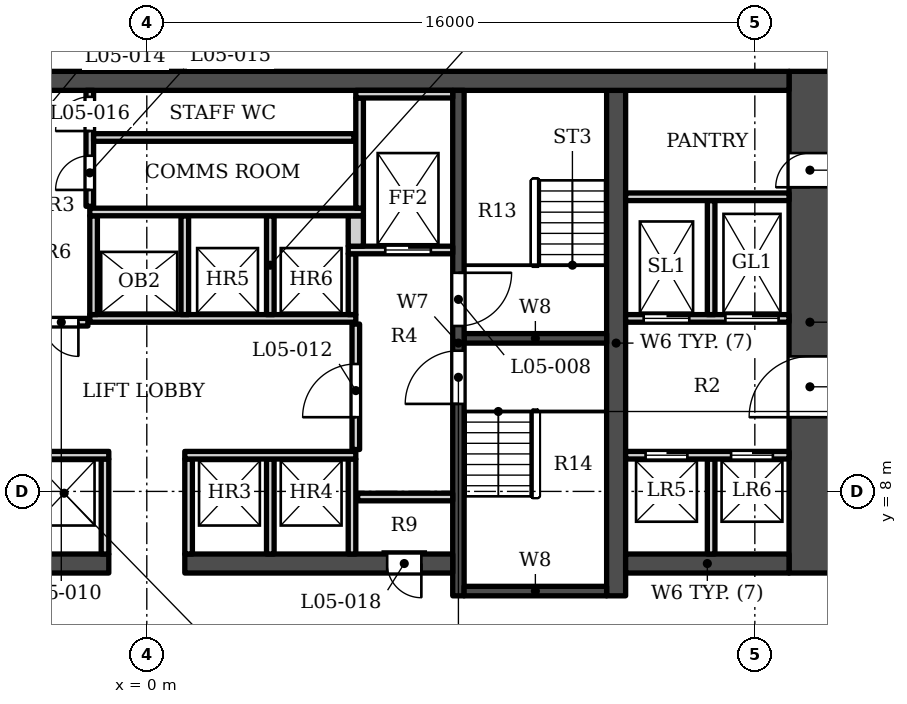
"""IFC4 building model, lengths in metres.
Left out: names, types, materials, properties, quantities, classifications, styles, units other than length and angle.
Written with IfcOpenShell. Run it as: python <this file> out.ifc"""

import sys

from ifc_helpers import new_model, si_unit, direction, frame, frame_2d, origin, place, context, subcontext, project, spatial, rectangle, extrude, element, fill, save


model = new_model("IFC4")
c1 = context("Model", 3, precision=1e-05, world=origin(), true_north=direction((0.0, 1.0)))
c2 = subcontext(c1, "Body", "Model", "MODEL_VIEW")
j1 = project(units=[si_unit("LENGTHUNIT", "METRE"), si_unit("PLANEANGLEUNIT", "RADIAN")], contexts=[c1])
p1 = place(None, origin())
s1 = spatial("IfcSite", under=j1, at=p1, CompositionType="ELEMENT")
p2 = place(p1, origin())
s2 = spatial("IfcBuilding", under=s1, at=p2, CompositionType="ELEMENT")
p3 = place(p2, frame((0.0, 0.0, 40.0)))
s3 = spatial("IfcBuildingStorey", under=s2, at=p3, CompositionType="ELEMENT", Elevation=40.0)
p4 = place(p3, frame((-16.9, 18.802, 0.0), z_axis=(0.0, 0.0, 1.0), x_axis=(1.0, 0.0, 0.0)))
e1 = element("IfcWall", 1, at=p4, inside=s3, PredefinedType="SHEAR", context=c2, shape_type="SweptSolid", body=[
    extrude(rectangle(XDim=33.8, YDim=0.5, at=frame_2d((16.9, 0.0))), origin(), (0.0, 0.0, 1.0), 6.0),
])
p5 = place(p3, frame((12.35, 5.253, 0.0), z_axis=(0.0, 0.0, 1.0), x_axis=(0.0, 1.0, 0.0)))
e2 = element("IfcWall", 2, at=p5, inside=s3, PredefinedType="SHEAR", context=c2, shape_type="SweptSolid", body=[
    extrude(rectangle(XDim=13.3, YDim=0.5, at=frame_2d((6.65, 0.0))), origin(), (0.0, 0.0, 1.0), 6.0),
])
p6 = place(p3, frame((8.2, 5.253, 0.0), z_axis=(0.0, 0.0, 1.0), x_axis=(0.0, 1.0, 0.0)))
e3 = element("IfcWall", 3, at=p6, inside=s3, PredefinedType="SHEAR", context=c2, shape_type="SweptSolid", body=[
    extrude(rectangle(XDim=13.3, YDim=0.3, at=frame_2d((6.65, 0.0))), origin(), (0.0, 0.0, 1.0), 6.0),
])
p7 = place(p6, frame((7.1, 0.0, 0.0)))
e4 = element("IfcOpeningElement", 4, at=p7, cuts=e3, PredefinedType="OPENING", context=c2, shape_type="SweptSolid", body=[
    extrude(rectangle(XDim=1.4, YDim=2.1, at=frame_2d((0.7, 1.05))), frame((0.0, 0.16, 0.0), z_axis=(0.0, -1.0, 0.0), x_axis=(1.0, 0.0, 0.0)), (0.0, 0.0, 1.0), 0.32),
])
p8 = place(p6, frame((5.05, 0.0, 0.0)))
e5 = element("IfcOpeningElement", 5, at=p8, cuts=e3, PredefinedType="OPENING", context=c2, shape_type="SweptSolid", body=[
    extrude(rectangle(XDim=1.4, YDim=2.1, at=frame_2d((0.7, 1.05))), frame((0.0, 0.16, 0.0), z_axis=(0.0, -1.0, 0.0), x_axis=(1.0, 0.0, 0.0)), (0.0, 0.0, 1.0), 0.32),
])
for number, where, z_axis, x_axis in (
    (6, (8.35, 12.028, 0.0), (0.0, 0.0, 1.0), (1.0, 0.0, 0.0)),
    (7, (8.35, 5.378, 0.0), (0.0, 0.0, 1.0), (1.0, 0.0, 0.0)),
):
    element("IfcWall", number, at=place(p3, frame(where, z_axis=z_axis, x_axis=x_axis)), inside=s3, PredefinedType="SHEAR", context=c2, shape_type="SweptSolid", body=[
        extrude(rectangle(XDim=3.75, YDim=0.25, at=frame_2d((1.875, 0.0))), origin(), (0.0, 0.0, 1.0), 6.0),
    ])
p9 = place(p3, frame((-8.05, 6.103, 0.0), z_axis=(0.0, 0.0, 1.0), x_axis=(1.0, 0.0, 0.0)))
e8 = element("IfcWall", 8, at=p9, inside=s3, PredefinedType="SHEAR", context=c2, shape_type="SweptSolid", body=[
    extrude(rectangle(XDim=7.05, YDim=0.5, at=frame_2d((3.525, 0.0))), origin(), (0.0, 0.0, 1.0), 6.0),
])
p10 = place(p9, frame((0.825, 0.0, 0.0)))
e9 = element("IfcOpeningElement", 9, at=p10, cuts=e8, PredefinedType="OPENING", context=c2, shape_type="SweptSolid", body=[
    extrude(rectangle(XDim=0.9, YDim=2.1, at=frame_2d((0.45, 1.05))), frame((0.0, 0.26, 0.0), z_axis=(0.0, -1.0, 0.0), x_axis=(1.0, 0.0, 0.0)), (0.0, 0.0, 1.0), 0.52),
])
p11 = place(p3, frame((1.0, 6.103, 0.0), z_axis=(0.0, 0.0, 1.0), x_axis=(1.0, 0.0, 0.0)))
e10 = element("IfcWall", 10, at=p11, inside=s3, PredefinedType="SHEAR", context=c2, shape_type="SweptSolid", body=[
    extrude(rectangle(XDim=7.05, YDim=0.5, at=frame_2d((3.525, 0.0))), origin(), (0.0, 0.0, 1.0), 6.0),
])
p12 = place(p11, frame((5.325, 0.0, 0.0)))
e11 = element("IfcOpeningElement", 11, at=p12, cuts=e10, PredefinedType="OPENING", context=c2, shape_type="SweptSolid", body=[
    extrude(rectangle(XDim=0.9, YDim=2.1, at=frame_2d((0.45, 1.05))), frame((0.0, 0.26, 0.0), z_axis=(0.0, -1.0, 0.0), x_axis=(1.0, 0.0, 0.0)), (0.0, 0.0, 1.0), 0.52),
])
p13 = place(p3, frame((12.6, 6.103, 0.0), z_axis=(0.0, 0.0, 1.0), x_axis=(1.0, 0.0, 0.0)))
e12 = element("IfcWall", 12, at=p13, inside=s3, PredefinedType="SHEAR", context=c2, shape_type="SweptSolid", body=[
    extrude(rectangle(XDim=4.3, YDim=0.5, at=frame_2d((2.15, 0.0))), origin(), (0.0, 0.0, 1.0), 6.0),
])
p14 = place(p3, frame((17.45, 5.853, 0.0), z_axis=(0.0, 0.0, 1.0), x_axis=(0.0, 1.0, 0.0)))
e13 = element("IfcWall", 13, at=p14, inside=s3, PredefinedType="SHEAR", context=c2, shape_type="SweptSolid", body=[
    extrude(rectangle(XDim=13.2, YDim=1.1, at=frame_2d((6.6, 0.0))), origin(), (0.0, 0.0, 1.0), 6.0),
])
p15 = place(p14, frame((4.1, 0.0, 0.0)))
e14 = element("IfcOpeningElement", 14, at=p15, cuts=e13, PredefinedType="OPENING", context=c2, shape_type="SweptSolid", body=[
    extrude(rectangle(XDim=1.6, YDim=2.1, at=frame_2d((0.8, 1.05))), frame((0.0, 0.56, 0.0), z_axis=(0.0, -1.0, 0.0), x_axis=(1.0, 0.0, 0.0)), (0.0, 0.0, 1.0), 1.12),
])
p16 = place(p14, frame((10.15, 0.0, 0.0)))
e15 = element("IfcOpeningElement", 15, at=p16, cuts=e13, PredefinedType="OPENING", context=c2, shape_type="SweptSolid", body=[
    extrude(rectangle(XDim=0.9, YDim=2.1, at=frame_2d((0.45, 1.05))), frame((0.0, 0.56, 0.0), z_axis=(0.0, -1.0, 0.0), x_axis=(1.0, 0.0, 0.0)), (0.0, 0.0, 1.0), 1.12),
])
for number, where, z_axis, x_axis in (
    (16, (-1.1, 6.353, 0.0), (0.0, 0.0, 1.0), (0.0, 1.0, 0.0)),
    (17, (1.1, 6.353, 0.0), (0.0, 0.0, 1.0), (0.0, 1.0, 0.0)),
    (18, (3.25, 6.353, 0.0), (0.0, 0.0, 1.0), (0.0, 1.0, 0.0)),
    (19, (5.4, 6.353, 0.0), (0.0, 0.0, 1.0), (0.0, 1.0, 0.0)),
    (20, (14.85, 6.353, 0.0), (0.0, 0.0, 1.0), (0.0, 1.0, 0.0)),
    (21, (5.55, 7.853, 0.0), (0.0, 0.0, 1.0), (1.0, 0.0, 0.0)),
):
    element("IfcWall", number, at=place(p3, frame(where, z_axis=z_axis, x_axis=x_axis)), inside=s3, PredefinedType="SOLIDWALL", context=c2, shape_type="SweptSolid", body=[
        extrude(rectangle(XDim=2.5, YDim=0.2, at=frame_2d((1.25, 0.0))), origin(), (0.0, 0.0, 1.0), 5.55),
    ])
for number, where, z_axis, x_axis in (
    (22, (-5.5, 8.953, 0.0), (0.0, 0.0, 1.0), (1.0, 0.0, 0.0)),
    (23, (1.0, 8.953, 0.0), (0.0, 0.0, 1.0), (1.0, 0.0, 0.0)),
):
    element("IfcWall", number, at=place(p3, frame(where, z_axis=z_axis, x_axis=x_axis)), inside=s3, PredefinedType="SOLIDWALL", context=c2, shape_type="SweptSolid", body=[
        extrude(rectangle(XDim=4.5, YDim=0.2, at=frame_2d((2.25, 0.0))), origin(), (0.0, 0.0, 1.0), 5.55),
    ])
p17 = place(p3, frame((12.6, 8.953, 0.0), z_axis=(0.0, 0.0, 1.0), x_axis=(1.0, 0.0, 0.0)))
e24 = element("IfcWall", 24, at=p17, inside=s3, PredefinedType="SOLIDWALL", context=c2, shape_type="SweptSolid", body=[
    extrude(rectangle(XDim=4.3, YDim=0.2, at=frame_2d((2.15, 0.0))), origin(), (0.0, 0.0, 1.0), 5.55),
])
p18 = place(p17, frame((0.525, 0.0, 0.0)))
e25 = element("IfcOpeningElement", 25, at=p18, cuts=e24, PredefinedType="OPENING", context=c2, shape_type="SweptSolid", body=[
    extrude(rectangle(XDim=1.1, YDim=2.1, at=frame_2d((0.55, 1.05))), frame((0.0, 0.11, 0.0), z_axis=(0.0, -1.0, 0.0), x_axis=(1.0, 0.0, 0.0)), (0.0, 0.0, 1.0), 0.22),
])
p19 = place(p17, frame((2.775, 0.0, 0.0)))
e26 = element("IfcOpeningElement", 26, at=p19, cuts=e24, PredefinedType="OPENING", context=c2, shape_type="SweptSolid", body=[
    extrude(rectangle(XDim=1.1, YDim=2.1, at=frame_2d((0.55, 1.05))), frame((0.0, 0.11, 0.0), z_axis=(0.0, -1.0, 0.0), x_axis=(1.0, 0.0, 0.0)), (0.0, 0.0, 1.0), 0.22),
])
p20 = place(p3, frame((5.5, 9.103, 0.0), z_axis=(0.0, 0.0, 1.0), x_axis=(0.0, 1.0, 0.0)))
e27 = element("IfcWall", 27, at=p20, inside=s3, PredefinedType="SOLIDWALL", context=c2, shape_type="SweptSolid", body=[
    extrude(rectangle(XDim=3.3, YDim=0.2, at=frame_2d((1.65, 0.0))), origin(), (0.0, 0.0, 1.0), 5.55),
])
p21 = place(p20, frame((0.85, 0.0, 0.0)))
e28 = element("IfcOpeningElement", 28, at=p21, cuts=e27, PredefinedType="OPENING", context=c2, shape_type="SweptSolid", body=[
    extrude(rectangle(XDim=1.4, YDim=2.1, at=frame_2d((0.7, 1.05))), frame((0.0, 0.11, 0.0), z_axis=(0.0, -1.0, 0.0), x_axis=(1.0, 0.0, 0.0)), (0.0, 0.0, 1.0), 0.22),
])
p22 = place(p3, frame((-2.95, 12.453, 0.0), z_axis=(0.0, 0.0, 1.0), x_axis=(1.0, 0.0, 0.0)))
e29 = element("IfcWall", 29, at=p22, inside=s3, PredefinedType="SOLIDWALL", context=c2, shape_type="SweptSolid", body=[
    extrude(rectangle(XDim=1.4, YDim=0.2, at=frame_2d((0.7, 0.0))), origin(), (0.0, 0.0, 1.0), 5.55),
])
p23 = place(p22, frame((0.25, 0.0, 0.0)))
e30 = element("IfcOpeningElement", 30, at=p23, cuts=e29, PredefinedType="OPENING", context=c2, shape_type="SweptSolid", body=[
    extrude(rectangle(XDim=0.9, YDim=2.1, at=frame_2d((0.45, 1.05))), frame((0.0, 0.11, 0.0), z_axis=(0.0, -1.0, 0.0), x_axis=(1.0, 0.0, 0.0)), (0.0, 0.0, 1.0), 0.22),
])
p24 = place(p3, frame((-1.5, 12.552, 0.0), z_axis=(0.0, 0.0, 1.0), x_axis=(1.0, 0.0, 0.0)))
e31 = element("IfcWall", 31, at=p24, inside=s3, PredefinedType="SOLIDWALL", context=c2, shape_type="SweptSolid", body=[
    extrude(rectangle(XDim=7.0, YDim=0.2, at=frame_2d((3.5, 0.0))), origin(), (0.0, 0.0, 1.0), 5.55),
])
p25 = place(p3, frame((12.6, 12.552, 0.0), z_axis=(0.0, 0.0, 1.0), x_axis=(1.0, 0.0, 0.0)))
e32 = element("IfcWall", 32, at=p25, inside=s3, PredefinedType="SOLIDWALL", context=c2, shape_type="SweptSolid", body=[
    extrude(rectangle(XDim=4.3, YDim=0.2, at=frame_2d((2.15, 0.0))), origin(), (0.0, 0.0, 1.0), 5.55),
])
p26 = place(p25, frame((0.475, 0.0, 0.0)))
e33 = element("IfcOpeningElement", 33, at=p26, cuts=e32, PredefinedType="OPENING", context=c2, shape_type="SweptSolid", body=[
    extrude(rectangle(XDim=1.2, YDim=2.1, at=frame_2d((0.6, 1.05))), frame((0.0, 0.11, 0.0), z_axis=(0.0, -1.0, 0.0), x_axis=(1.0, 0.0, 0.0)), (0.0, 0.0, 1.0), 0.22),
])
p27 = place(p25, frame((2.625, 0.0, 0.0)))
e34 = element("IfcOpeningElement", 34, at=p27, cuts=e32, PredefinedType="OPENING", context=c2, shape_type="SweptSolid", body=[
    extrude(rectangle(XDim=1.4, YDim=2.1, at=frame_2d((0.7, 1.05))), frame((0.0, 0.11, 0.0), z_axis=(0.0, -1.0, 0.0), x_axis=(1.0, 0.0, 0.0)), (0.0, 0.0, 1.0), 0.22),
])
for number, where, z_axis, x_axis in (
    (35, (-1.4, 12.653, 0.0), (0.0, 0.0, 1.0), (0.0, 1.0, 0.0)),
    (36, (1.0, 12.653, 0.0), (0.0, 0.0, 1.0), (0.0, 1.0, 0.0)),
    (37, (3.25, 12.653, 0.0), (0.0, 0.0, 1.0), (0.0, 1.0, 0.0)),
):
    element("IfcWall", number, at=place(p3, frame(where, z_axis=z_axis, x_axis=x_axis)), inside=s3, PredefinedType="SOLIDWALL", context=c2, shape_type="SweptSolid", body=[
        extrude(rectangle(XDim=2.6, YDim=0.2, at=frame_2d((1.3, 0.0))), origin(), (0.0, 0.0, 1.0), 5.55),
    ])
p28 = place(p3, frame((5.4, 12.653, 0.0), z_axis=(0.0, 0.0, 1.0), x_axis=(0.0, 1.0, 0.0)))
e38 = element("IfcWall", 38, at=p28, inside=s3, PredefinedType="SOLIDWALL", context=c2, shape_type="SweptSolid", body=[
    extrude(rectangle(XDim=1.6, YDim=0.2, at=frame_2d((0.8, 0.0))), origin(), (0.0, 0.0, 1.0), 5.55),
])
p29 = place(p3, frame((14.85, 12.653, 0.0), z_axis=(0.0, 0.0, 1.0), x_axis=(0.0, 1.0, 0.0)))
e39 = element("IfcWall", 39, at=p29, inside=s3, PredefinedType="SOLIDWALL", context=c2, shape_type="SweptSolid", body=[
    extrude(rectangle(XDim=3.0, YDim=0.2, at=frame_2d((1.5, 0.0))), origin(), (0.0, 0.0, 1.0), 5.55),
])
p30 = place(p3, frame((5.3, 14.353, 0.0), z_axis=(0.0, 0.0, 1.0), x_axis=(1.0, 0.0, 0.0)))
e40 = element("IfcWall", 40, at=p30, inside=s3, PredefinedType="SOLIDWALL", context=c2, shape_type="SweptSolid", body=[
    extrude(rectangle(XDim=2.75, YDim=0.2, at=frame_2d((1.375, 0.0))), origin(), (0.0, 0.0, 1.0), 5.55),
])
p31 = place(p30, frame((0.975, 0.0, 0.0)))
e41 = element("IfcOpeningElement", 41, at=p31, cuts=e40, PredefinedType="OPENING", context=c2, shape_type="SweptSolid", body=[
    extrude(rectangle(XDim=1.2, YDim=2.1, at=frame_2d((0.6, 1.05))), frame((0.0, 0.11, 0.0), z_axis=(0.0, -1.0, 0.0), x_axis=(1.0, 0.0, 0.0)), (0.0, 0.0, 1.0), 0.22),
])
p32 = place(p3, frame((5.5, 14.453, 0.0), z_axis=(0.0, 0.0, 1.0), x_axis=(0.0, 1.0, 0.0)))
e42 = element("IfcWall", 42, at=p32, inside=s3, PredefinedType="SOLIDWALL", context=c2, shape_type="SweptSolid", body=[
    extrude(rectangle(XDim=0.8, YDim=0.4, at=frame_2d((0.4, 0.0))), origin(), (0.0, 0.0, 1.0), 5.55),
])
p33 = place(p3, frame((-1.5, 15.353, 0.0), z_axis=(0.0, 0.0, 1.0), x_axis=(1.0, 0.0, 0.0)))
e43 = element("IfcWall", 43, at=p33, inside=s3, PredefinedType="SOLIDWALL", context=c2, shape_type="SweptSolid", body=[
    extrude(rectangle(XDim=7.2, YDim=0.2, at=frame_2d((3.6, 0.0))), origin(), (0.0, 0.0, 1.0), 5.55),
])
p34 = place(p3, frame((5.6, 15.453, 0.0), z_axis=(0.0, 0.0, 1.0), x_axis=(0.0, 1.0, 0.0)))
e44 = element("IfcWall", 44, at=p34, inside=s3, PredefinedType="SOLIDWALL", context=c2, shape_type="SweptSolid", body=[
    extrude(rectangle(XDim=2.9, YDim=0.2, at=frame_2d((1.45, 0.0))), origin(), (0.0, 0.0, 1.0), 5.55),
])
p35 = place(p3, frame((-1.5, 15.503, 0.0), z_axis=(0.0, 0.0, 1.0), x_axis=(0.0, 1.0, 0.0)))
e45 = element("IfcWall", 45, at=p35, inside=s3, PredefinedType="SOLIDWALL", context=c2, shape_type="SweptSolid", body=[
    extrude(rectangle(XDim=3.05, YDim=0.2, at=frame_2d((1.525, 0.0))), origin(), (0.0, 0.0, 1.0), 5.55),
])
p36 = place(p35, frame((0.43, 0.0, 0.0)))
e46 = element("IfcOpeningElement", 46, at=p36, cuts=e45, PredefinedType="OPENING", context=c2, shape_type="SweptSolid", body=[
    extrude(rectangle(XDim=0.9, YDim=2.1, at=frame_2d((0.45, 1.05))), frame((0.0, 0.11, 0.0), z_axis=(0.0, -1.0, 0.0), x_axis=(1.0, 0.0, 0.0)), (0.0, 0.0, 1.0), 0.22),
])
p37 = place(p35, frame((1.98, 0.0, 0.0)))
e47 = element("IfcOpeningElement", 47, at=p37, cuts=e45, PredefinedType="OPENING", context=c2, shape_type="SweptSolid", body=[
    extrude(rectangle(XDim=0.9, YDim=2.1, at=frame_2d((0.45, 1.05))), frame((0.0, 0.11, 0.0), z_axis=(0.0, -1.0, 0.0), x_axis=(1.0, 0.0, 0.0)), (0.0, 0.0, 1.0), 0.22),
])
p38 = place(p3, frame((12.6, 15.753, 0.0), z_axis=(0.0, 0.0, 1.0), x_axis=(1.0, 0.0, 0.0)))
e48 = element("IfcWall", 48, at=p38, inside=s3, PredefinedType="SOLIDWALL", context=c2, shape_type="SweptSolid", body=[
    extrude(rectangle(XDim=4.3, YDim=0.2, at=frame_2d((2.15, 0.0))), origin(), (0.0, 0.0, 1.0), 5.55),
])
p39 = place(p3, frame((-1.4, 17.312, 0.0), z_axis=(0.0, 0.0, 1.0), x_axis=(1.0, 0.0, 0.0)))
e49 = element("IfcWall", 49, at=p39, inside=s3, PredefinedType="SOLIDWALL", context=c2, shape_type="SweptSolid", body=[
    extrude(rectangle(XDim=6.85, YDim=0.2, at=frame_2d((3.425, 0.0))), origin(), (0.0, 0.0, 1.0), 5.55),
])
p40 = place(p3, frame((5.5, 18.453, 0.0), z_axis=(0.0, 0.0, 1.0), x_axis=(1.0, 0.0, 0.0)))
e50 = element("IfcWall", 50, at=p40, inside=s3, PredefinedType="SOLIDWALL", context=c2, shape_type="SweptSolid", body=[
    extrude(rectangle(XDim=2.55, YDim=0.2, at=frame_2d((1.275, 0.0))), origin(), (0.0, 0.0, 1.0), 5.55),
])
p41 = place(p31, origin())
e51 = element("IfcDoor", 51, at=p41, inside=s3, OperationType="DOUBLE_DOOR_SLIDING", PredefinedType="DOOR", context=c2, shape_type="SweptSolid", body=[
    extrude(rectangle(XDim=1.2, YDim=2.1, at=frame_2d((0.6, 1.05))), frame((0.0, 0.025, 0.0), z_axis=(0.0, -1.0, 0.0), x_axis=(1.0, 0.0, 0.0)), (0.0, 0.0, 1.0), 0.05),
])
fill(e41, e51)
p42 = place(p18, origin())
e52 = element("IfcDoor", 52, at=p42, inside=s3, OperationType="DOUBLE_DOOR_SLIDING", PredefinedType="DOOR", context=c2, shape_type="SweptSolid", body=[
    extrude(rectangle(XDim=1.1, YDim=2.1, at=frame_2d((0.55, 1.05))), frame((0.0, 0.025, 0.0), z_axis=(0.0, -1.0, 0.0), x_axis=(1.0, 0.0, 0.0)), (0.0, 0.0, 1.0), 0.05),
])
fill(e25, e52)
p43 = place(p19, origin())
e53 = element("IfcDoor", 53, at=p43, inside=s3, OperationType="DOUBLE_DOOR_SLIDING", PredefinedType="DOOR", context=c2, shape_type="SweptSolid", body=[
    extrude(rectangle(XDim=1.1, YDim=2.1, at=frame_2d((0.55, 1.05))), frame((0.0, 0.025, 0.0), z_axis=(0.0, -1.0, 0.0), x_axis=(1.0, 0.0, 0.0)), (0.0, 0.0, 1.0), 0.05),
])
fill(e26, e53)
p44 = place(p26, origin())
e54 = element("IfcDoor", 54, at=p44, inside=s3, OperationType="DOUBLE_DOOR_SLIDING", PredefinedType="DOOR", context=c2, shape_type="SweptSolid", body=[
    extrude(rectangle(XDim=1.2, YDim=2.1, at=frame_2d((0.6, 1.05))), frame((0.0, 0.025, 0.0), z_axis=(0.0, -1.0, 0.0), x_axis=(1.0, 0.0, 0.0)), (0.0, 0.0, 1.0), 0.05),
])
fill(e33, e54)
p45 = place(p27, origin())
e55 = element("IfcDoor", 55, at=p45, inside=s3, OperationType="DOUBLE_DOOR_SLIDING", PredefinedType="DOOR", context=c2, shape_type="SweptSolid", body=[
    extrude(rectangle(XDim=1.4, YDim=2.1, at=frame_2d((0.7, 1.05))), frame((0.0, 0.025, 0.0), z_axis=(0.0, -1.0, 0.0), x_axis=(1.0, 0.0, 0.0)), (0.0, 0.0, 1.0), 0.05),
])
fill(e34, e55)
p46 = place(p7, origin())
e56 = element("IfcDoor", 56, at=p46, inside=s3, OperationType="SINGLE_SWING_RIGHT", PredefinedType="DOOR", context=c2, shape_type="SweptSolid", body=[
    extrude(rectangle(XDim=1.4, YDim=2.1, at=frame_2d((0.7, 1.05))), frame((0.0, 0.025, 0.0), z_axis=(0.0, -1.0, 0.0), x_axis=(1.0, 0.0, 0.0)), (0.0, 0.0, 1.0), 0.05),
])
fill(e4, e56)
p47 = place(p8, origin())
e57 = element("IfcDoor", 57, at=p47, inside=s3, OperationType="SINGLE_SWING_LEFT", PredefinedType="DOOR", context=c2, shape_type="SweptSolid", body=[
    extrude(rectangle(XDim=1.4, YDim=2.1, at=frame_2d((0.7, 1.05))), frame((0.0, 0.025, 0.0), z_axis=(0.0, -1.0, 0.0), x_axis=(1.0, 0.0, 0.0)), (0.0, 0.0, 1.0), 0.05),
])
fill(e5, e57)
p48 = place(p23, origin())
e58 = element("IfcDoor", 58, at=p48, inside=s3, OperationType="SINGLE_SWING_RIGHT", PredefinedType="DOOR", context=c2, shape_type="SweptSolid", body=[
    extrude(rectangle(XDim=0.9, YDim=2.1, at=frame_2d((0.45, 1.05))), frame((0.0, 0.025, 0.0), z_axis=(0.0, -1.0, 0.0), x_axis=(1.0, 0.0, 0.0)), (0.0, 0.0, 1.0), 0.05),
])
fill(e30, e58)
p49 = place(p21, origin())
e59 = element("IfcDoor", 59, at=p49, inside=s3, OperationType="SINGLE_SWING_LEFT", PredefinedType="DOOR", context=c2, shape_type="SweptSolid", body=[
    extrude(rectangle(XDim=1.4, YDim=2.1, at=frame_2d((0.7, 1.05))), frame((0.0, 0.025, 0.0), z_axis=(0.0, -1.0, 0.0), x_axis=(1.0, 0.0, 0.0)), (0.0, 0.0, 1.0), 0.05),
])
fill(e28, e59)
p50 = place(p36, origin())
e60 = element("IfcDoor", 60, at=p50, inside=s3, OperationType="SINGLE_SWING_LEFT", PredefinedType="DOOR", context=c2, shape_type="SweptSolid", body=[
    extrude(rectangle(XDim=0.9, YDim=2.1, at=frame_2d((0.45, 1.05))), frame((0.0, 0.025, 0.0), z_axis=(0.0, -1.0, 0.0), x_axis=(1.0, 0.0, 0.0)), (0.0, 0.0, 1.0), 0.05),
])
fill(e46, e60)
p51 = place(p37, origin())
e61 = element("IfcDoor", 61, at=p51, inside=s3, OperationType="SINGLE_SWING_LEFT", PredefinedType="DOOR", context=c2, shape_type="SweptSolid", body=[
    extrude(rectangle(XDim=0.9, YDim=2.1, at=frame_2d((0.45, 1.05))), frame((0.0, 0.025, 0.0), z_axis=(0.0, -1.0, 0.0), x_axis=(1.0, 0.0, 0.0)), (0.0, 0.0, 1.0), 0.05),
])
fill(e47, e61)
p52 = place(p12, origin())
e62 = element("IfcDoor", 62, at=p52, inside=s3, OperationType="SINGLE_SWING_RIGHT", PredefinedType="DOOR", context=c2, shape_type="SweptSolid", body=[
    extrude(rectangle(XDim=0.9, YDim=2.1, at=frame_2d((0.45, 1.05))), frame((0.0, 0.025, 0.0), z_axis=(0.0, -1.0, 0.0), x_axis=(1.0, 0.0, 0.0)), (0.0, 0.0, 1.0), 0.05),
])
fill(e11, e62)
p53 = place(p15, origin())
e63 = element("IfcDoor", 63, at=p53, inside=s3, OperationType="DOUBLE_DOOR_SINGLE_SWING", PredefinedType="DOOR", context=c2, shape_type="SweptSolid", body=[
    extrude(rectangle(XDim=1.6, YDim=2.1, at=frame_2d((0.8, 1.05))), frame((0.0, 0.275, 0.0), z_axis=(0.0, -1.0, 0.0), x_axis=(1.0, 0.0, 0.0)), (0.0, 0.0, 1.0), 0.05),
])
fill(e14, e63)
p54 = place(p16, origin())
e64 = element("IfcDoor", 64, at=p54, inside=s3, OperationType="SINGLE_SWING_LEFT", PredefinedType="DOOR", context=c2, shape_type="SweptSolid", body=[
    extrude(rectangle(XDim=0.9, YDim=2.1, at=frame_2d((0.45, 1.05))), frame((0.0, 0.275, 0.0), z_axis=(0.0, -1.0, 0.0), x_axis=(1.0, 0.0, 0.0)), (0.0, 0.0, 1.0), 0.05),
])
fill(e15, e64)
save(model, sys.argv[1])
